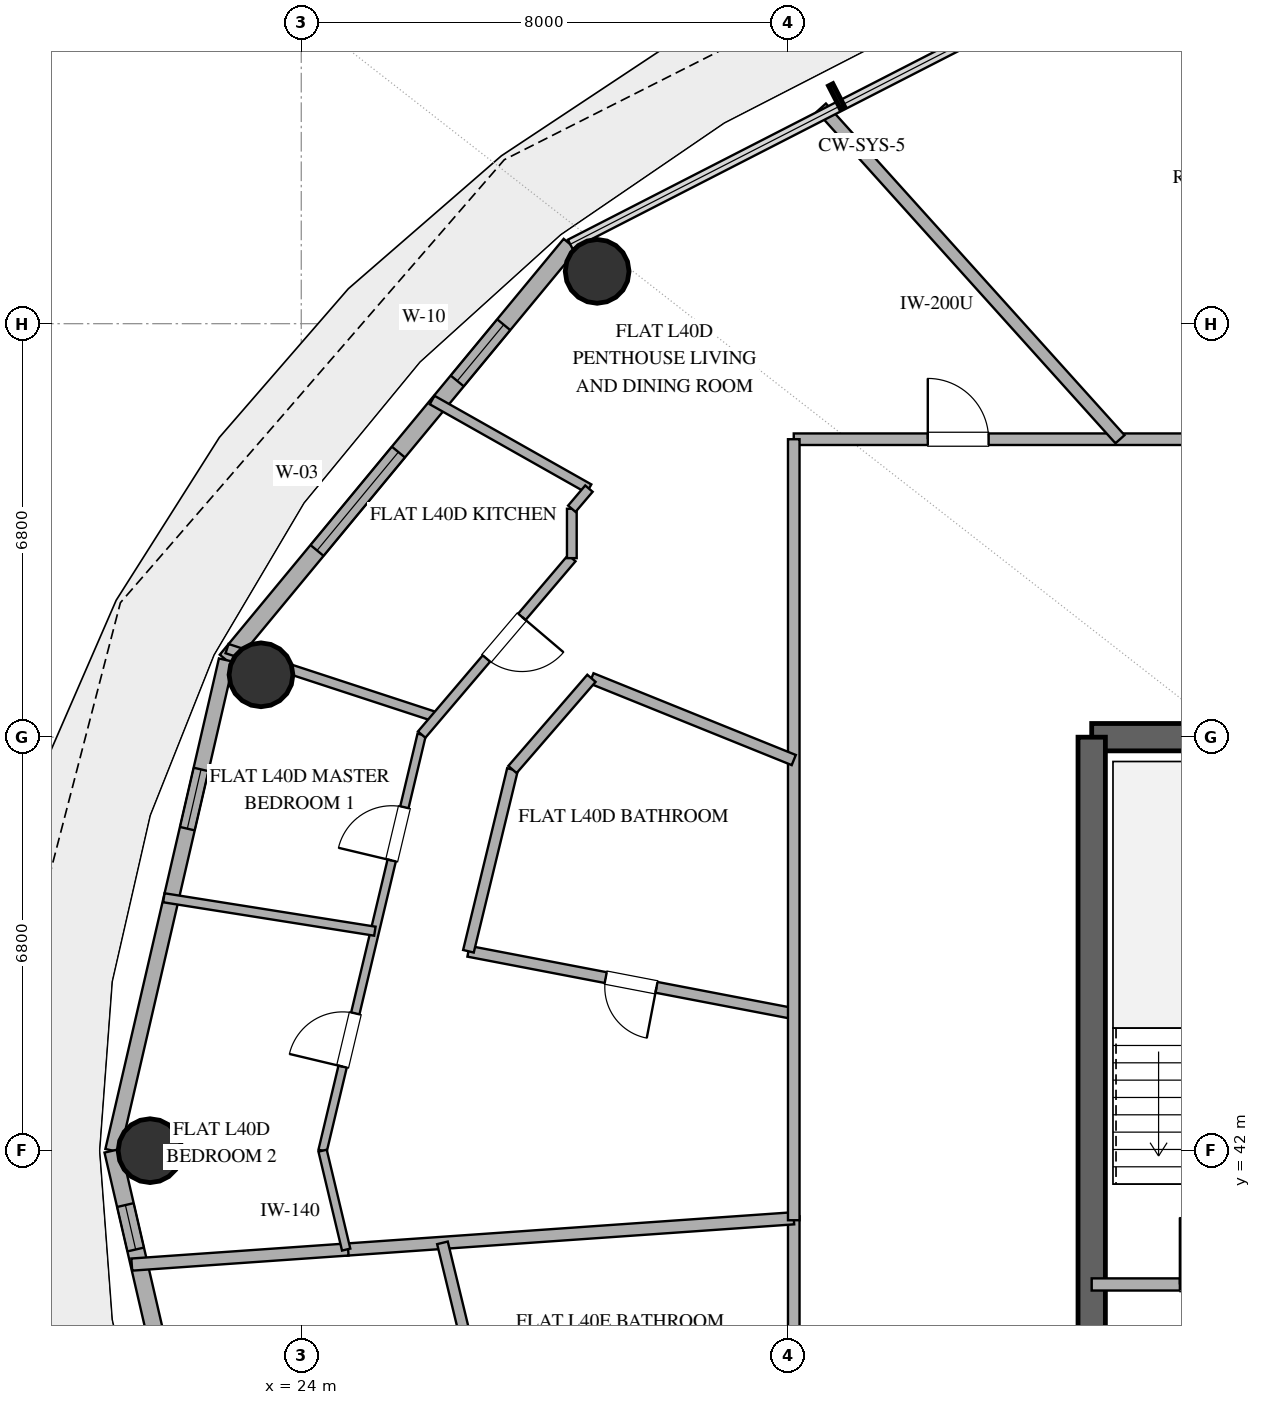
"""IFC4 building model, lengths in metres.
Left out: names, types, materials, properties, quantities, classifications, styles, units other than length and angle.
Written with IfcOpenShell. Run it as: python <this file> out.ifc"""

import sys

from ifc_helpers import new_model, si_unit, direction, frame, frame_2d, origin, origin_2d, place, context, subcontext, project, spatial, rectangle, hollow_circle, extrude, element, fill, save


model = new_model("IFC4")
c1 = context("Model", 3, precision=1e-05, world=origin(), true_north=direction((0.0, 1.0)))
c2 = subcontext(c1, "Body", "Model", "MODEL_VIEW")
j1 = project(units=[si_unit("LENGTHUNIT", "METRE"), si_unit("PLANEANGLEUNIT", "RADIAN")], contexts=[c1])
p1 = place(None, origin())
s1 = spatial("IfcSite", under=j1, at=p1, CompositionType="ELEMENT")
p2 = place(p1, origin())
s2 = spatial("IfcBuilding", under=s1, at=p2, CompositionType="ELEMENT")
p3 = place(p2, frame((0.0, 0.0, 161.4)))
s3 = spatial("IfcBuildingStorey", under=s2, at=p3, CompositionType="ELEMENT", Elevation=161.4)
p4 = place(p3, frame((37.0, 48.8, 0.0), z_axis=(0.0, 0.0, 1.0), x_axis=(1.0, 0.0, 0.0)))
e1 = element("IfcWall", 1, at=p4, inside=s3, PredefinedType="SHEAR", context=c2, shape_type="SweptSolid", body=[
    extrude(rectangle(XDim=4.0, YDim=0.45, at=frame_2d((2.0, 0.0))), origin(), (0.0, 0.0, 1.0), 3.38),
])
p5 = place(p3, frame((37.0, 35.2, 0.0), z_axis=(0.0, 0.0, 1.0), x_axis=(0.0, 1.0, 0.0)))
e2 = element("IfcWall", 2, at=p5, inside=s3, PredefinedType="SHEAR", context=c2, shape_type="SweptSolid", body=[
    extrude(rectangle(XDim=13.6, YDim=0.45, at=frame_2d((6.8, 0.0))), origin(), (0.0, 0.0, 1.0), 3.38),
])
for number, where, z_axis, x_axis in (
    (3, (28.866, 56.46, 0.0), (0.0, 0.0, 1.0), (1.0, 0.0, 0.0)),
    (4, (23.338, 49.826, 0.0), (0.0, 0.0, 1.0), (1.0, 0.0, 0.0)),
    (5, (21.513, 42.0, 0.0), (0.0, 0.0, 1.0), (1.0, 0.0, 0.0)),
):
    element("IfcColumn", number, at=place(p3, frame(where, z_axis=z_axis, x_axis=x_axis)), inside=s3, PredefinedType="COLUMN", context=c2, shape_type="SweptSolid", body=[
        extrude(hollow_circle(Radius=0.525, WallThickness=0.028, at=origin_2d()), origin(), (0.0, 0.0, 1.0), 3.38),
    ])
p6 = place(p3, frame((28.424, 56.906, 0.0), z_axis=(0.0, 0.0, 1.0), x_axis=(-0.637333477683, -0.770588111915, 0.0)))
e6 = element("IfcWall", 6, at=p6, inside=s3, PredefinedType="SOLIDWALL", context=c2, shape_type="SweptSolid", body=[
    extrude(rectangle(XDim=8.875, YDim=0.28, at=frame_2d((4.438, 0.0))), origin(), (0.0, 0.0, 1.0), 3.38),
])
p7 = place(p6, frame((1.716, 0.0, 0.85)))
e7 = element("IfcOpeningElement", 7, at=p7, cuts=e6, PredefinedType="OPENING", context=c2, shape_type="SweptSolid", body=[
    extrude(rectangle(XDim=1.2, YDim=1.6, at=frame_2d((0.6, 0.8))), frame((0.0, 0.15, 0.0), z_axis=(0.0, -1.0, 0.0), x_axis=(1.0, 0.0, 0.0)), (0.0, 0.0, 1.0), 0.3),
])
p8 = place(p6, frame((4.434, 0.0, 0.85)))
e8 = element("IfcOpeningElement", 8, at=p8, cuts=e6, PredefinedType="OPENING", context=c2, shape_type="SweptSolid", body=[
    extrude(rectangle(XDim=2.1, YDim=2.2, at=frame_2d((1.05, 1.1))), frame((0.0, 0.15, 0.0), z_axis=(0.0, -1.0, 0.0), x_axis=(1.0, 0.0, 0.0)), (0.0, 0.0, 1.0), 0.3),
])
p9 = place(p3, frame((22.768, 50.067, 0.0), z_axis=(0.0, 0.0, 1.0), x_axis=(-0.225473184558, -0.974249374157, 0.0)))
e9 = element("IfcWall", 9, at=p9, inside=s3, PredefinedType="SOLIDWALL", context=c2, shape_type="SweptSolid", body=[
    extrude(rectangle(XDim=8.28, YDim=0.25, at=frame_2d((4.14, 0.0))), origin(), (0.0, 0.0, 1.0), 3.38),
])
p10 = place(p9, frame((1.844, 0.0, 1.42)))
e10 = element("IfcOpeningElement", 10, at=p10, cuts=e9, PredefinedType="OPENING", context=c2, shape_type="SweptSolid", body=[
    extrude(rectangle(XDim=1.0, YDim=1.05, at=frame_2d((0.5, 0.525))), frame((0.0, 0.135, 0.0), z_axis=(0.0, -1.0, 0.0), x_axis=(1.0, 0.0, 0.0)), (0.0, 0.0, 1.0), 0.27),
])
p11 = place(p3, frame((20.901, 42.0, 0.0), z_axis=(0.0, 0.0, 1.0), x_axis=(0.225473184558, -0.974249374157, 0.0)))
e11 = element("IfcWall", 11, at=p11, inside=s3, PredefinedType="SOLIDWALL", context=c2, shape_type="SweptSolid", body=[
    extrude(rectangle(XDim=8.28, YDim=0.28, at=frame_2d((4.14, 0.0))), origin(), (0.0, 0.0, 1.0), 3.38),
])
p12 = place(p11, frame((5.644, 0.0, 0.0)))
e12 = element("IfcOpeningElement", 12, at=p12, cuts=e11, PredefinedType="OPENING", context=c2, shape_type="SweptSolid", body=[
    extrude(rectangle(XDim=1.1, YDim=2.25, at=frame_2d((0.55, 1.125))), frame((0.0, 0.15, 0.0), z_axis=(0.0, -1.0, 0.0), x_axis=(1.0, 0.0, 0.0)), (0.0, 0.0, 1.0), 0.3),
])
p13 = place(p11, frame((0.918, 0.0, 0.85)))
e13 = element("IfcOpeningElement", 13, at=p13, cuts=e11, PredefinedType="OPENING", context=c2, shape_type="SweptSolid", body=[
    extrude(rectangle(XDim=0.75, YDim=1.8, at=frame_2d((0.375, 0.9))), frame((0.0, 0.15, 0.0), z_axis=(0.0, -1.0, 0.0), x_axis=(1.0, 0.0, 0.0)), (0.0, 0.0, 1.0), 0.3),
])
p14 = place(p3, frame((37.0, 39.8, 0.0), z_axis=(0.0, 0.0, 1.0), x_axis=(1.0, 0.0, 0.0)))
e14 = element("IfcWall", 14, at=p14, inside=s3, PredefinedType="SOLIDWALL", context=c2, shape_type="SweptSolid", body=[
    extrude(rectangle(XDim=4.0, YDim=0.2, at=frame_2d((2.0, 0.0))), origin(), (0.0, 0.0, 1.0), 2.74),
])
p15 = place(p14, frame((1.45, 0.0, 0.0)))
e15 = element("IfcOpeningElement", 15, at=p15, cuts=e14, PredefinedType="OPENING", context=c2, shape_type="SweptSolid", body=[
    extrude(rectangle(XDim=1.1, YDim=2.15, at=frame_2d((0.55, 1.075))), frame((0.0, 0.11, 0.0), z_axis=(0.0, -1.0, 0.0), x_axis=(1.0, 0.0, 0.0)), (0.0, 0.0, 1.0), 0.22),
])
p16 = place(p3, frame((32.1, 53.7, 0.0), z_axis=(0.0, 0.0, 1.0), x_axis=(1.0, 0.0, 0.0)))
e16 = element("IfcWall", 16, at=p16, inside=s3, PredefinedType="PARTITIONING", context=c2, shape_type="SweptSolid", body=[
    extrude(rectangle(XDim=19.477, YDim=0.19, at=frame_2d((9.738, 0.0))), origin(), (0.0, 0.0, 1.0), 2.74),
])
p17 = place(p16, frame((9.923, 0.0, 0.0)))
e17 = element("IfcOpeningElement", 17, at=p17, cuts=e16, PredefinedType="OPENING", context=c2, shape_type="SweptSolid", body=[
    extrude(rectangle(XDim=1.0, YDim=2.2, at=frame_2d((0.5, 1.1))), frame((0.0, 0.105, 0.0), z_axis=(0.0, -1.0, 0.0), x_axis=(1.0, 0.0, 0.0)), (0.0, 0.0, 1.0), 0.21),
])
p18 = place(p16, frame((2.204, 0.0, 0.0)))
e18 = element("IfcOpeningElement", 18, at=p18, cuts=e16, PredefinedType="OPENING", context=c2, shape_type="SweptSolid", body=[
    extrude(rectangle(XDim=1.0, YDim=2.2, at=frame_2d((0.5, 1.1))), frame((0.0, 0.105, 0.0), z_axis=(0.0, -1.0, 0.0), x_axis=(1.0, 0.0, 0.0)), (0.0, 0.0, 1.0), 0.21),
])
p19 = place(p3, frame((32.1, 30.3, 0.0), z_axis=(0.0, 0.0, 1.0), x_axis=(0.0, 1.0, 0.0)))
e19 = element("IfcWall", 19, at=p19, inside=s3, PredefinedType="PARTITIONING", context=c2, shape_type="SweptSolid", body=[
    extrude(rectangle(XDim=10.62, YDim=0.19, at=frame_2d((5.31, 0.0))), origin(), (0.0, 0.0, 1.0), 2.74),
])
p20 = place(p19, frame((3.475, 0.0, 0.0)))
e20 = element("IfcOpeningElement", 20, at=p20, cuts=e19, PredefinedType="OPENING", context=c2, shape_type="SweptSolid", body=[
    extrude(rectangle(XDim=1.0, YDim=2.2, at=frame_2d((0.5, 1.1))), frame((0.0, 0.105, 0.0), z_axis=(0.0, -1.0, 0.0), x_axis=(1.0, 0.0, 0.0)), (0.0, 0.0, 1.0), 0.21),
])
p21 = place(p3, frame((37.465, 53.7, 0.0), z_axis=(0.0, 0.0, 1.0), x_axis=(-0.669128292476, 0.7431469089, 0.0)))
e21 = element("IfcWall", 21, at=p21, inside=s3, PredefinedType="PARTITIONING", context=c2, shape_type="SweptSolid", body=[
    extrude(rectangle(XDim=7.339, YDim=0.2, at=frame_2d((3.669, 0.0))), origin(), (0.0, 0.0, 1.0), 2.74),
])
p22 = place(p3, frame((32.1, 40.888, 0.0), z_axis=(0.0, 0.0, 1.0), x_axis=(-0.997562906323, -0.069772830877, 0.0)))
e22 = element("IfcWall", 22, at=p22, inside=s3, PredefinedType="PARTITIONING", context=c2, shape_type="SweptSolid", body=[
    extrude(rectangle(XDim=7.38, YDim=0.2, at=frame_2d((3.69, 0.0))), origin(), (0.0, 0.0, 1.0), 2.74),
])
p23 = place(p3, frame((32.1, 44.253, 0.0), z_axis=(0.0, 0.0, 1.0), x_axis=(-0.982102846986, 0.188345421878, 0.0)))
e23 = element("IfcWall", 23, at=p23, inside=s3, PredefinedType="PLUMBINGWALL", context=c2, shape_type="SweptSolid", body=[
    extrude(rectangle(XDim=5.448, YDim=0.18, at=frame_2d((2.724, 0.0))), origin(), (0.0, 0.0, 1.0), 2.74),
])
p24 = place(p23, frame((2.299, 0.0, 0.0)))
e24 = element("IfcOpeningElement", 24, at=p24, cuts=e23, PredefinedType="OPENING", context=c2, shape_type="SweptSolid", body=[
    extrude(rectangle(XDim=0.85, YDim=2.1, at=frame_2d((0.425, 1.05))), frame((0.0, 0.1, 0.0), z_axis=(0.0, -1.0, 0.0), x_axis=(1.0, 0.0, 0.0)), (0.0, 0.0, 1.0), 0.2),
])
p25 = place(p3, frame((32.1, 40.856, 0.0), z_axis=(0.0, 0.0, 1.0), x_axis=(0.0, 1.0, 0.0)))
e25 = element("IfcWall", 25, at=p25, inside=s3, PredefinedType="PARTITIONING", context=c2, shape_type="SweptSolid", body=[
    extrude(rectangle(XDim=12.844, YDim=0.19, at=frame_2d((6.422, 0.0))), origin(), (0.0, 0.0, 1.0), 2.74),
])
p26 = place(p3, frame((26.322, 40.484, 0.0), z_axis=(0.0, 0.0, 1.0), x_axis=(0.235484788327, -0.971878034769, 0.0)))
e26 = element("IfcWall", 26, at=p26, inside=s3, PredefinedType="PLUMBINGWALL", context=c2, shape_type="SweptSolid", body=[
    extrude(rectangle(XDim=4.73, YDim=0.18, at=frame_2d((2.365, 0.0))), origin(), (0.0, 0.0, 1.0), 2.74),
])
p27 = place(p3, frame((24.351, 42.0, 0.0), z_axis=(0.0, 0.0, 1.0), x_axis=(0.231625219966, 0.972805097373, 0.0)))
e27 = element("IfcWall", 27, at=p27, inside=s3, PredefinedType="PARTITIONING", context=c2, shape_type="SweptSolid", body=[
    extrude(rectangle(XDim=7.033, YDim=0.14, at=frame_2d((3.517, 0.0))), origin(), (0.0, 0.0, 1.0), 2.74),
])
p28 = place(p27, frame((1.421, 0.0, 0.0)))
e28 = element("IfcOpeningElement", 28, at=p28, cuts=e27, PredefinedType="OPENING", context=c2, shape_type="SweptSolid", body=[
    extrude(rectangle(XDim=0.9, YDim=2.1, at=frame_2d((0.45, 1.05))), frame((0.0, 0.08, 0.0), z_axis=(0.0, -1.0, 0.0), x_axis=(1.0, 0.0, 0.0)), (0.0, 0.0, 1.0), 0.16),
])
p29 = place(p27, frame((4.906, 0.0, 0.0)))
e29 = element("IfcOpeningElement", 29, at=p29, cuts=e27, PredefinedType="OPENING", context=c2, shape_type="SweptSolid", body=[
    extrude(rectangle(XDim=0.9, YDim=2.1, at=frame_2d((0.45, 1.05))), frame((0.0, 0.08, 0.0), z_axis=(0.0, -1.0, 0.0), x_axis=(1.0, 0.0, 0.0)), (0.0, 0.0, 1.0), 0.16),
])
p30 = place(p3, frame((22.78, 50.257, 0.0), z_axis=(0.0, 0.0, 1.0), x_axis=(0.95036707557, -0.311130875474, 0.0)))
e30 = element("IfcWall", 30, at=p30, inside=s3, PredefinedType="PLUMBINGWALL", context=c2, shape_type="SweptSolid", body=[
    extrude(rectangle(XDim=3.625, YDim=0.16, at=frame_2d((1.812, 0.0))), origin(), (0.0, 0.0, 1.0), 2.74),
])
p31 = place(p3, frame((28.773, 49.768, 0.0), z_axis=(0.0, 0.0, 1.0), x_axis=(0.927195040954, -0.374578904945, 0.0)))
e31 = element("IfcWall", 31, at=p31, inside=s3, PredefinedType="PLUMBINGWALL", context=c2, shape_type="SweptSolid", body=[
    extrude(rectangle(XDim=3.589, YDim=0.18, at=frame_2d((1.794, 0.0))), origin(), (0.0, 0.0, 1.0), 2.74),
])
p32 = place(p3, frame((21.212, 40.127, 0.0), z_axis=(0.0, 0.0, 1.0), x_axis=(0.997565256009, 0.069739228586, 0.0)))
e32 = element("IfcWall", 32, at=p32, inside=s3, PredefinedType="PARTITIONING", context=c2, shape_type="SweptSolid", body=[
    extrude(rectangle(XDim=3.567, YDim=0.2, at=frame_2d((1.784, 0.0))), origin(), (0.0, 0.0, 1.0), 2.74),
])
p33 = place(p3, frame((25.211, 45.61, 0.0), z_axis=(0.0, 0.0, 1.0), x_axis=(-0.987691308322, 0.156415726399, 0.0)))
e33 = element("IfcWall", 33, at=p33, inside=s3, PredefinedType="PARTITIONING", context=c2, shape_type="SweptSolid", body=[
    extrude(rectangle(XDim=3.513, YDim=0.15, at=frame_2d((1.757, 0.0))), origin(), (0.0, 0.0, 1.0), 2.74),
])
p34 = place(p3, frame((28.45, 51.744, 0.0), z_axis=(0.0, 0.0, 1.0), x_axis=(-0.648022171798, -0.761621470849, 0.0)))
e34 = element("IfcWall", 34, at=p34, inside=s3, PredefinedType="PLUMBINGWALL", context=c2, shape_type="SweptSolid", body=[
    extrude(rectangle(XDim=3.81, YDim=0.16, at=frame_2d((1.905, 0.0))), origin(), (0.0, 0.0, 1.0), 2.74),
])
p35 = place(p34, frame((1.267, 0.0, 0.0)))
e35 = element("IfcOpeningElement", 35, at=p35, cuts=e34, PredefinedType="OPENING", context=c2, shape_type="SweptSolid", body=[
    extrude(rectangle(XDim=0.9, YDim=2.1, at=frame_2d((0.45, 1.05))), frame((0.0, 0.09, 0.0), z_axis=(0.0, -1.0, 0.0), x_axis=(1.0, 0.0, 0.0)), (0.0, 0.0, 1.0), 0.18),
])
p36 = place(p3, frame((26.75, 45.279, 0.0), z_axis=(0.0, 0.0, 1.0), x_axis=(0.235525049635, 0.971868278624, 0.0)))
e36 = element("IfcWall", 36, at=p36, inside=s3, PredefinedType="PLUMBINGWALL", context=c2, shape_type="SweptSolid", body=[
    extrude(rectangle(XDim=3.075, YDim=0.18, at=frame_2d((1.538, 0.0))), origin(), (0.0, 0.0, 1.0), 2.74),
])
p37 = place(p3, frame((26.152, 54.345, 0.0), z_axis=(0.0, 0.0, 1.0), x_axis=(0.870631902874, -0.491935046219, 0.0)))
e37 = element("IfcWall", 37, at=p37, inside=s3, PredefinedType="PLUMBINGWALL", context=c2, shape_type="SweptSolid", body=[
    extrude(rectangle(XDim=2.962, YDim=0.16, at=frame_2d((1.481, 0.0))), origin(), (0.0, 0.0, 1.0), 2.74),
])
p38 = place(p3, frame((27.474, 48.268, 0.0), z_axis=(0.0, 0.0, 1.0), x_axis=(0.654593195673, 0.755981314702, 0.0)))
e38 = element("IfcWall", 38, at=p38, inside=s3, PredefinedType="PLUMBINGWALL", context=c2, shape_type="SweptSolid", body=[
    extrude(rectangle(XDim=1.984, YDim=0.18, at=frame_2d((0.992, 0.0))), origin(), (0.0, 0.0, 1.0), 2.74),
])
p39 = place(p3, frame((24.739, 40.373, 0.0), z_axis=(0.0, 0.0, 1.0), x_axis=(-0.231561310927, 0.972820311919, 0.0)))
e39 = element("IfcWall", 39, at=p39, inside=s3, PredefinedType="PARTITIONING", context=c2, shape_type="SweptSolid", body=[
    extrude(rectangle(XDim=1.672, YDim=0.14, at=frame_2d((0.836, 0.0))), origin(), (0.0, 0.0, 1.0), 2.74),
])
p40 = place(p3, frame((28.45, 52.557, 0.0), z_axis=(0.0, 0.0, 1.0), x_axis=(0.0, -1.0, 0.0)))
e40 = element("IfcWall", 40, at=p40, inside=s3, PredefinedType="PLUMBINGWALL", context=c2, shape_type="SweptSolid", body=[
    extrude(rectangle(XDim=0.812, YDim=0.16, at=frame_2d((0.406, 0.0))), origin(), (0.0, 0.0, 1.0), 2.74),
])
p41 = place(p3, frame((28.731, 52.887, 0.0), z_axis=(0.0, 0.0, 1.0), x_axis=(-0.648056208932, -0.761592509196, 0.0)))
e41 = element("IfcWall", 41, at=p41, inside=s3, PredefinedType="PLUMBINGWALL", context=c2, shape_type="SweptSolid", body=[
    extrude(rectangle(XDim=0.434, YDim=0.16, at=frame_2d((0.217, 0.0))), origin(), (0.0, 0.0, 1.0), 2.74),
])
p42 = place(p7, origin())
e42 = element("IfcWindow", 42, at=p42, inside=s3, PartitioningType="SINGLE_PANEL", PredefinedType="WINDOW", context=c2, shape_type="SweptSolid", body=[
    extrude(rectangle(XDim=1.2, YDim=1.6, at=frame_2d((0.6, 0.8))), frame((0.0, 0.03, 0.0), z_axis=(0.0, -1.0, 0.0), x_axis=(1.0, 0.0, 0.0)), (0.0, 0.0, 1.0), 0.06),
])
fill(e7, e42)
p43 = place(p8, origin())
e43 = element("IfcWindow", 43, at=p43, inside=s3, PartitioningType="SINGLE_PANEL", PredefinedType="WINDOW", context=c2, shape_type="SweptSolid", body=[
    extrude(rectangle(XDim=2.1, YDim=2.2, at=frame_2d((1.05, 1.1))), frame((0.0, 0.03, 0.0), z_axis=(0.0, -1.0, 0.0), x_axis=(1.0, 0.0, 0.0)), (0.0, 0.0, 1.0), 0.06),
])
fill(e8, e43)
p44 = place(p10, origin())
e44 = element("IfcWindow", 44, at=p44, inside=s3, PartitioningType="SINGLE_PANEL", PredefinedType="WINDOW", context=c2, shape_type="SweptSolid", body=[
    extrude(rectangle(XDim=1.0, YDim=1.05, at=frame_2d((0.5, 0.525))), frame((0.0, 0.03, 0.0), z_axis=(0.0, -1.0, 0.0), x_axis=(1.0, 0.0, 0.0)), (0.0, 0.0, 1.0), 0.06),
])
fill(e10, e44)
p45 = place(p13, origin())
e45 = element("IfcWindow", 45, at=p45, inside=s3, PartitioningType="SINGLE_PANEL", PredefinedType="WINDOW", context=c2, shape_type="SweptSolid", body=[
    extrude(rectangle(XDim=0.75, YDim=1.8, at=frame_2d((0.375, 0.9))), frame((0.0, 0.03, 0.0), z_axis=(0.0, -1.0, 0.0), x_axis=(1.0, 0.0, 0.0)), (0.0, 0.0, 1.0), 0.06),
])
fill(e13, e45)
p46 = place(p15, origin())
e46 = element("IfcDoor", 46, at=p46, inside=s3, OperationType="SINGLE_SWING_LEFT", PredefinedType="DOOR", context=c2, shape_type="SweptSolid", body=[
    extrude(rectangle(XDim=1.1, YDim=2.15, at=frame_2d((0.55, 1.075))), frame((0.0, 0.025, 0.0), z_axis=(0.0, -1.0, 0.0), x_axis=(1.0, 0.0, 0.0)), (0.0, 0.0, 1.0), 0.05),
])
fill(e15, e46)
p47 = place(p18, origin())
e47 = element("IfcDoor", 47, at=p47, inside=s3, OperationType="SINGLE_SWING_LEFT", PredefinedType="DOOR", context=c2, shape_type="SweptSolid", body=[
    extrude(rectangle(XDim=1.0, YDim=2.2, at=frame_2d((0.5, 1.1))), frame((0.0, 0.025, 0.0), z_axis=(0.0, -1.0, 0.0), x_axis=(1.0, 0.0, 0.0)), (0.0, 0.0, 1.0), 0.05),
])
fill(e18, e47)
p48 = place(p24, origin())
e48 = element("IfcDoor", 48, at=p48, inside=s3, OperationType="SINGLE_SWING_LEFT", PredefinedType="DOOR", context=c2, shape_type="SweptSolid", body=[
    extrude(rectangle(XDim=0.85, YDim=2.1, at=frame_2d((0.425, 1.05))), frame((0.0, 0.025, 0.0), z_axis=(0.0, -1.0, 0.0), x_axis=(1.0, 0.0, 0.0)), (0.0, 0.0, 1.0), 0.05),
])
fill(e24, e48)
p49 = place(p28, origin())
e49 = element("IfcDoor", 49, at=p49, inside=s3, OperationType="SINGLE_SWING_LEFT", PredefinedType="DOOR", context=c2, shape_type="SweptSolid", body=[
    extrude(rectangle(XDim=0.9, YDim=2.1, at=frame_2d((0.45, 1.05))), frame((0.0, 0.025, 0.0), z_axis=(0.0, -1.0, 0.0), x_axis=(1.0, 0.0, 0.0)), (0.0, 0.0, 1.0), 0.05),
])
fill(e28, e49)
p50 = place(p29, origin())
e50 = element("IfcDoor", 50, at=p50, inside=s3, OperationType="SINGLE_SWING_LEFT", PredefinedType="DOOR", context=c2, shape_type="SweptSolid", body=[
    extrude(rectangle(XDim=0.9, YDim=2.1, at=frame_2d((0.45, 1.05))), frame((0.0, 0.025, 0.0), z_axis=(0.0, -1.0, 0.0), x_axis=(1.0, 0.0, 0.0)), (0.0, 0.0, 1.0), 0.05),
])
fill(e29, e50)
p51 = place(p35, origin())
e51 = element("IfcDoor", 51, at=p51, inside=s3, OperationType="SINGLE_SWING_LEFT", PredefinedType="DOOR", context=c2, shape_type="SweptSolid", body=[
    extrude(rectangle(XDim=0.9, YDim=2.1, at=frame_2d((0.45, 1.05))), frame((0.0, 0.025, 0.0), z_axis=(0.0, -1.0, 0.0), x_axis=(1.0, 0.0, 0.0)), (0.0, 0.0, 1.0), 0.05),
])
fill(e35, e51)
save(model, sys.argv[1])
